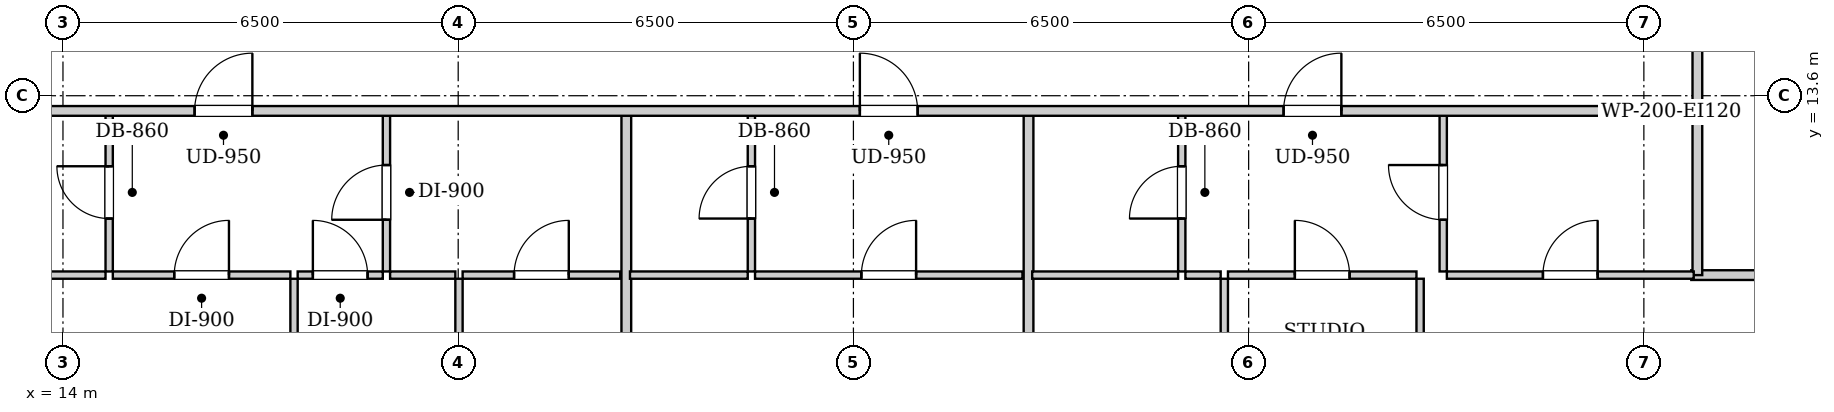
"""IFC4 building model, lengths in metres.
Left out: names, types, materials, properties, quantities, classifications, styles, units other than length and angle.
Written with IfcOpenShell. Run it as: python <this file> out.ifc"""

import sys

from ifc_helpers import new_model, si_unit, direction, frame, frame_2d, origin, place, context, subcontext, project, spatial, rectangle, extrude, element, fill, save


model = new_model("IFC4")
c1 = context("Model", 3, precision=1e-05, world=origin(), true_north=direction((0.0, 1.0)))
c2 = subcontext(c1, "Body", "Model", "MODEL_VIEW")
j1 = project(units=[si_unit("LENGTHUNIT", "METRE"), si_unit("PLANEANGLEUNIT", "RADIAN")], contexts=[c1])
p1 = place(None, origin())
s1 = spatial("IfcSite", under=j1, at=p1, CompositionType="ELEMENT")
p2 = place(p1, origin())
s2 = spatial("IfcBuilding", under=s1, at=p2, CompositionType="ELEMENT")
p3 = place(p2, frame((0.0, 0.0, 87.9)))
s3 = spatial("IfcBuildingStorey", under=s2, at=p3, CompositionType="ELEMENT", Elevation=87.9)
p4 = place(p3, frame((40.88, 13.35, 0.0), z_axis=(0.0, 0.0, 1.0), x_axis=(0.0, 1.0, 0.0)))
e1 = element("IfcWall", 1, at=p4, inside=s3, PredefinedType="PARTITIONING", context=c2, shape_type="SweptSolid", body=[
    extrude(rectangle(XDim=1.74, YDim=0.16, at=frame_2d((0.87, 0.0))), origin(), (0.0, 0.0, 1.0), 2.94),
])
p5 = place(p3, frame((14.76, 10.71, 0.0), z_axis=(0.0, 0.0, 1.0), x_axis=(0.0, 1.0, 0.0)))
e2 = element("IfcWall", 2, at=p5, inside=s3, PredefinedType="PARTITIONING", context=c2, shape_type="SweptSolid", body=[
    extrude(rectangle(XDim=2.6, YDim=0.12, at=frame_2d((1.3, 0.0))), origin(), (0.0, 0.0, 1.0), 2.94),
])
p6 = place(p5, frame((0.87, 0.0, 0.0)))
e3 = element("IfcOpeningElement", 3, at=p6, cuts=e2, PredefinedType="OPENING", context=c2, shape_type="SweptSolid", body=[
    extrude(rectangle(XDim=0.86, YDim=2.05, at=frame_2d((0.43, 1.025))), frame((0.0, 0.07, 0.0), z_axis=(0.0, -1.0, 0.0), x_axis=(1.0, 0.0, 0.0)), (0.0, 0.0, 1.0), 0.14),
])
p7 = place(p3, frame((12.3, 10.65, 0.0), z_axis=(0.0, 0.0, 1.0), x_axis=(1.0, 0.0, 0.0)))
e4 = element("IfcWall", 4, at=p7, inside=s3, PredefinedType="PARTITIONING", context=c2, shape_type="SweptSolid", body=[
    extrude(rectangle(XDim=2.4, YDim=0.12, at=frame_2d((1.2, 0.0))), origin(), (0.0, 0.0, 1.0), 2.94),
])
p8 = place(p3, frame((19.32, 10.71, 0.0), z_axis=(0.0, 0.0, 1.0), x_axis=(0.0, 1.0, 0.0)))
e5 = element("IfcWall", 5, at=p8, inside=s3, PredefinedType="PARTITIONING", context=c2, shape_type="SweptSolid", body=[
    extrude(rectangle(XDim=2.6, YDim=0.12, at=frame_2d((1.3, 0.0))), origin(), (0.0, 0.0, 1.0), 2.94),
])
p9 = place(p8, frame((0.85, 0.0, 0.0)))
e6 = element("IfcOpeningElement", 6, at=p9, cuts=e5, PredefinedType="OPENING", context=c2, shape_type="SweptSolid", body=[
    extrude(rectangle(XDim=0.9, YDim=2.05, at=frame_2d((0.45, 1.025))), frame((0.0, 0.07, 0.0), z_axis=(0.0, -1.0, 0.0), x_axis=(1.0, 0.0, 0.0)), (0.0, 0.0, 1.0), 0.14),
])
p10 = place(p3, frame((14.82, 10.65, 0.0), z_axis=(0.0, 0.0, 1.0), x_axis=(1.0, 0.0, 0.0)))
e7 = element("IfcWall", 7, at=p10, inside=s3, PredefinedType="PARTITIONING", context=c2, shape_type="SweptSolid", body=[
    extrude(rectangle(XDim=2.92, YDim=0.12, at=frame_2d((1.46, 0.0))), origin(), (0.0, 0.0, 1.0), 2.94),
])
p11 = place(p10, frame((1.01, 0.0, 0.0)))
e8 = element("IfcOpeningElement", 8, at=p11, cuts=e7, PredefinedType="OPENING", context=c2, shape_type="SweptSolid", body=[
    extrude(rectangle(XDim=0.9, YDim=2.05, at=frame_2d((0.45, 1.025))), frame((0.0, 0.07, 0.0), z_axis=(0.0, -1.0, 0.0), x_axis=(1.0, 0.0, 0.0)), (0.0, 0.0, 1.0), 0.14),
])
p12 = place(p3, frame((17.86, 10.65, 0.0), z_axis=(0.0, 0.0, 1.0), x_axis=(1.0, 0.0, 0.0)))
e9 = element("IfcWall", 9, at=p12, inside=s3, PredefinedType="PARTITIONING", context=c2, shape_type="SweptSolid", body=[
    extrude(rectangle(XDim=1.4, YDim=0.12, at=frame_2d((0.7, 0.0))), origin(), (0.0, 0.0, 1.0), 2.94),
])
p13 = place(p12, frame((0.25, 0.0, 0.0)))
e10 = element("IfcOpeningElement", 10, at=p13, cuts=e9, PredefinedType="OPENING", context=c2, shape_type="SweptSolid", body=[
    extrude(rectangle(XDim=0.9, YDim=2.05, at=frame_2d((0.45, 1.025))), frame((0.0, 0.07, 0.0), z_axis=(0.0, -1.0, 0.0), x_axis=(1.0, 0.0, 0.0)), (0.0, 0.0, 1.0), 0.14),
])
p14 = place(p3, frame((19.38, 10.65, 0.0), z_axis=(0.0, 0.0, 1.0), x_axis=(1.0, 0.0, 0.0)))
e11 = element("IfcWall", 11, at=p14, inside=s3, PredefinedType="PARTITIONING", context=c2, shape_type="SweptSolid", body=[
    extrude(rectangle(XDim=1.073, YDim=0.12, at=frame_2d((0.537, 0.0))), origin(), (0.0, 0.0, 1.0), 2.94),
])
p15 = place(p3, frame((20.573, 10.65, 0.0), z_axis=(0.0, 0.0, 1.0), x_axis=(1.0, 0.0, 0.0)))
e12 = element("IfcWall", 12, at=p15, inside=s3, PredefinedType="PARTITIONING", context=c2, shape_type="SweptSolid", body=[
    extrude(rectangle(XDim=2.592, YDim=0.12, at=frame_2d((1.296, 0.0))), origin(), (0.0, 0.0, 1.0), 2.94),
])
p16 = place(p15, frame((0.846, 0.0, 0.0)))
e13 = element("IfcOpeningElement", 13, at=p16, cuts=e12, PredefinedType="OPENING", context=c2, shape_type="SweptSolid", body=[
    extrude(rectangle(XDim=0.9, YDim=2.05, at=frame_2d((0.45, 1.025))), frame((0.0, 0.07, 0.0), z_axis=(0.0, -1.0, 0.0), x_axis=(1.0, 0.0, 0.0)), (0.0, 0.0, 1.0), 0.14),
])
p17 = place(p3, frame((17.8, 0.28, 0.0), z_axis=(0.0, 0.0, 1.0), x_axis=(0.0, 1.0, 0.0)))
e14 = element("IfcWall", 14, at=p17, inside=s3, PredefinedType="PARTITIONING", context=c2, shape_type="SweptSolid", body=[
    extrude(rectangle(XDim=10.31, YDim=0.12, at=frame_2d((5.155, 0.0))), origin(), (0.0, 0.0, 1.0), 2.309),
])
p18 = place(p17, frame((4.69, 0.0, 0.0)))
e15 = element("IfcOpeningElement", 15, at=p18, cuts=e14, PredefinedType="OPENING", context=c2, shape_type="SweptSolid", body=[
    extrude(rectangle(XDim=0.9, YDim=2.05, at=frame_2d((0.45, 1.025))), frame((0.0, 0.07, 0.0), z_axis=(0.0, -1.0, 0.0), x_axis=(1.0, 0.0, 0.0)), (0.0, 0.0, 1.0), 0.14),
])
p19 = place(p3, frame((20.513, 0.28, 0.0), z_axis=(0.0, 0.0, 1.0), x_axis=(0.0, 1.0, 0.0)))
e16 = element("IfcWall", 16, at=p19, inside=s3, PredefinedType="PARTITIONING", context=c2, shape_type="SweptSolid", body=[
    extrude(rectangle(XDim=10.31, YDim=0.12, at=frame_2d((5.155, 0.0))), origin(), (0.0, 0.0, 1.0), 2.94),
])
p20 = place(p19, frame((4.69, 0.0, 0.0)))
e17 = element("IfcOpeningElement", 17, at=p20, cuts=e16, PredefinedType="OPENING", context=c2, shape_type="SweptSolid", body=[
    extrude(rectangle(XDim=0.9, YDim=2.05, at=frame_2d((0.45, 1.025))), frame((0.0, 0.07, 0.0), z_axis=(0.0, -1.0, 0.0), x_axis=(1.0, 0.0, 0.0)), (0.0, 0.0, 1.0), 0.14),
])
p21 = place(p3, frame((23.265, 0.28, 0.0), z_axis=(0.0, 0.0, 1.0), x_axis=(0.0, 1.0, 0.0)))
e18 = element("IfcWall", 18, at=p21, inside=s3, PredefinedType="PARTITIONING", context=c2, shape_type="SweptSolid", body=[
    extrude(rectangle(XDim=13.03, YDim=0.16, at=frame_2d((6.515, 0.0))), origin(), (0.0, 0.0, 1.0), 2.94),
])
p22 = place(p3, frame((25.322, 10.71, 0.0), z_axis=(0.0, 0.0, 1.0), x_axis=(0.0, 1.0, 0.0)))
e19 = element("IfcWall", 19, at=p22, inside=s3, PredefinedType="PARTITIONING", context=c2, shape_type="SweptSolid", body=[
    extrude(rectangle(XDim=2.6, YDim=0.12, at=frame_2d((1.3, 0.0))), origin(), (0.0, 0.0, 1.0), 2.94),
])
p23 = place(p22, frame((0.87, 0.0, 0.0)))
e20 = element("IfcOpeningElement", 20, at=p23, cuts=e19, PredefinedType="OPENING", context=c2, shape_type="SweptSolid", body=[
    extrude(rectangle(XDim=0.86, YDim=2.05, at=frame_2d((0.43, 1.025))), frame((0.0, 0.07, 0.0), z_axis=(0.0, -1.0, 0.0), x_axis=(1.0, 0.0, 0.0)), (0.0, 0.0, 1.0), 0.14),
])
p24 = place(p3, frame((23.325, 10.65, 0.0), z_axis=(0.0, 0.0, 1.0), x_axis=(1.0, 0.0, 0.0)))
e21 = element("IfcWall", 21, at=p24, inside=s3, PredefinedType="PARTITIONING", context=c2, shape_type="SweptSolid", body=[
    extrude(rectangle(XDim=1.937, YDim=0.12, at=frame_2d((0.969, 0.0))), origin(), (0.0, 0.0, 1.0), 2.94),
])
p25 = place(p3, frame((25.382, 10.65, 0.0), z_axis=(0.0, 0.0, 1.0), x_axis=(1.0, 0.0, 0.0)))
e22 = element("IfcWall", 22, at=p25, inside=s3, PredefinedType="PARTITIONING", context=c2, shape_type="SweptSolid", body=[
    extrude(rectangle(XDim=4.398, YDim=0.12, at=frame_2d((2.199, 0.0))), origin(), (0.0, 0.0, 1.0), 2.94),
])
p26 = place(p25, frame((1.749, 0.0, 0.0)))
e23 = element("IfcOpeningElement", 23, at=p26, cuts=e22, PredefinedType="OPENING", context=c2, shape_type="SweptSolid", body=[
    extrude(rectangle(XDim=0.9, YDim=2.05, at=frame_2d((0.45, 1.025))), frame((0.0, 0.07, 0.0), z_axis=(0.0, -1.0, 0.0), x_axis=(1.0, 0.0, 0.0)), (0.0, 0.0, 1.0), 0.14),
])
p27 = place(p3, frame((40.78, 10.65, 0.0), z_axis=(0.0, 0.0, 1.0), x_axis=(1.0, 0.0, 0.0)))
e24 = element("IfcWall", 24, at=p27, inside=s3, PredefinedType="PARTITIONING", context=c2, shape_type="SweptSolid", body=[
    extrude(rectangle(XDim=2.34, YDim=0.16, at=frame_2d((1.17, 0.0))), origin(), (0.0, 0.0, 1.0), 2.94),
])
p28 = place(p3, frame((40.88, 10.65, 0.0), z_axis=(0.0, 0.0, 1.0), x_axis=(0.0, 1.0, 0.0)))
e25 = element("IfcWall", 25, at=p28, inside=s3, PredefinedType="PARTITIONING", context=c2, shape_type="SweptSolid", body=[
    extrude(rectangle(XDim=2.66, YDim=0.16, at=frame_2d((1.33, 0.0))), origin(), (0.0, 0.0, 1.0), 2.94),
])
p29 = place(p3, frame((29.88, 0.28, 0.0), z_axis=(0.0, 0.0, 1.0), x_axis=(0.0, 1.0, 0.0)))
e26 = element("IfcWall", 26, at=p29, inside=s3, PredefinedType="PARTITIONING", context=c2, shape_type="SweptSolid", body=[
    extrude(rectangle(XDim=13.03, YDim=0.16, at=frame_2d((6.515, 0.0))), origin(), (0.0, 0.0, 1.0), 2.94),
])
p30 = place(p3, frame((32.4, 10.71, 0.0), z_axis=(0.0, 0.0, 1.0), x_axis=(0.0, 1.0, 0.0)))
e27 = element("IfcWall", 27, at=p30, inside=s3, PredefinedType="PARTITIONING", context=c2, shape_type="SweptSolid", body=[
    extrude(rectangle(XDim=2.6, YDim=0.12, at=frame_2d((1.3, 0.0))), origin(), (0.0, 0.0, 1.0), 2.94),
])
p31 = place(p30, frame((0.87, 0.0, 0.0)))
e28 = element("IfcOpeningElement", 28, at=p31, cuts=e27, PredefinedType="OPENING", context=c2, shape_type="SweptSolid", body=[
    extrude(rectangle(XDim=0.86, YDim=2.05, at=frame_2d((0.43, 1.025))), frame((0.0, 0.07, 0.0), z_axis=(0.0, -1.0, 0.0), x_axis=(1.0, 0.0, 0.0)), (0.0, 0.0, 1.0), 0.14),
])
p32 = place(p3, frame((29.94, 10.65, 0.0), z_axis=(0.0, 0.0, 1.0), x_axis=(1.0, 0.0, 0.0)))
e29 = element("IfcWall", 29, at=p32, inside=s3, PredefinedType="PARTITIONING", context=c2, shape_type="SweptSolid", body=[
    extrude(rectangle(XDim=2.4, YDim=0.12, at=frame_2d((1.2, 0.0))), origin(), (0.0, 0.0, 1.0), 2.94),
])
p33 = place(p3, frame((36.7, 10.71, 0.0), z_axis=(0.0, 0.0, 1.0), x_axis=(0.0, 1.0, 0.0)))
e30 = element("IfcWall", 30, at=p33, inside=s3, PredefinedType="PARTITIONING", context=c2, shape_type="SweptSolid", body=[
    extrude(rectangle(XDim=2.6, YDim=0.12, at=frame_2d((1.3, 0.0))), origin(), (0.0, 0.0, 1.0), 2.94),
])
p34 = place(p33, frame((0.85, 0.0, 0.0)))
e31 = element("IfcOpeningElement", 31, at=p34, cuts=e30, PredefinedType="OPENING", context=c2, shape_type="SweptSolid", body=[
    extrude(rectangle(XDim=0.9, YDim=2.05, at=frame_2d((0.45, 1.025))), frame((0.0, 0.07, 0.0), z_axis=(0.0, -1.0, 0.0), x_axis=(1.0, 0.0, 0.0)), (0.0, 0.0, 1.0), 0.14),
])
p35 = place(p3, frame((32.46, 10.65, 0.0), z_axis=(0.0, 0.0, 1.0), x_axis=(1.0, 0.0, 0.0)))
e32 = element("IfcWall", 32, at=p35, inside=s3, PredefinedType="PARTITIONING", context=c2, shape_type="SweptSolid", body=[
    extrude(rectangle(XDim=0.58, YDim=0.12, at=frame_2d((0.29, 0.0))), origin(), (0.0, 0.0, 1.0), 2.94),
])
p36 = place(p3, frame((33.16, 10.65, 0.0), z_axis=(0.0, 0.0, 1.0), x_axis=(1.0, 0.0, 0.0)))
e33 = element("IfcWall", 33, at=p36, inside=s3, PredefinedType="PARTITIONING", context=c2, shape_type="SweptSolid", body=[
    extrude(rectangle(XDim=3.1, YDim=0.12, at=frame_2d((1.55, 0.0))), origin(), (0.0, 0.0, 1.0), 2.94),
])
p37 = place(p36, frame((1.1, 0.0, 0.0)))
e34 = element("IfcOpeningElement", 34, at=p37, cuts=e33, PredefinedType="OPENING", context=c2, shape_type="SweptSolid", body=[
    extrude(rectangle(XDim=0.9, YDim=2.05, at=frame_2d((0.45, 1.025))), frame((0.0, 0.07, 0.0), z_axis=(0.0, -1.0, 0.0), x_axis=(1.0, 0.0, 0.0)), (0.0, 0.0, 1.0), 0.14),
])
p38 = place(p3, frame((36.76, 10.65, 0.0), z_axis=(0.0, 0.0, 1.0), x_axis=(1.0, 0.0, 0.0)))
e35 = element("IfcWall", 35, at=p38, inside=s3, PredefinedType="PARTITIONING", context=c2, shape_type="SweptSolid", body=[
    extrude(rectangle(XDim=4.06, YDim=0.12, at=frame_2d((2.03, 0.0))), origin(), (0.0, 0.0, 1.0), 2.94),
])
p39 = place(p38, frame((1.58, 0.0, 0.0)))
e36 = element("IfcOpeningElement", 36, at=p39, cuts=e35, PredefinedType="OPENING", context=c2, shape_type="SweptSolid", body=[
    extrude(rectangle(XDim=0.9, YDim=2.05, at=frame_2d((0.45, 1.025))), frame((0.0, 0.07, 0.0), z_axis=(0.0, -1.0, 0.0), x_axis=(1.0, 0.0, 0.0)), (0.0, 0.0, 1.0), 0.14),
])
p40 = place(p3, frame((33.1, 0.28, 0.0), z_axis=(0.0, 0.0, 1.0), x_axis=(0.0, 1.0, 0.0)))
e37 = element("IfcWall", 37, at=p40, inside=s3, PredefinedType="PARTITIONING", context=c2, shape_type="SweptSolid", body=[
    extrude(rectangle(XDim=10.31, YDim=0.12, at=frame_2d((5.155, 0.0))), origin(), (0.0, 0.0, 1.0), 2.309),
])
p41 = place(p40, frame((4.69, 0.0, 0.0)))
e38 = element("IfcOpeningElement", 38, at=p41, cuts=e37, PredefinedType="OPENING", context=c2, shape_type="SweptSolid", body=[
    extrude(rectangle(XDim=0.9, YDim=2.05, at=frame_2d((0.45, 1.025))), frame((0.0, 0.07, 0.0), z_axis=(0.0, -1.0, 0.0), x_axis=(1.0, 0.0, 0.0)), (0.0, 0.0, 1.0), 0.14),
])
p42 = place(p3, frame((36.32, 0.28, 0.0), z_axis=(0.0, 0.0, 1.0), x_axis=(0.0, 1.0, 0.0)))
e39 = element("IfcWall", 39, at=p42, inside=s3, PredefinedType="PARTITIONING", context=c2, shape_type="SweptSolid", body=[
    extrude(rectangle(XDim=10.31, YDim=0.12, at=frame_2d((5.155, 0.0))), origin(), (0.0, 0.0, 1.0), 2.94),
])
p43 = place(p42, frame((4.69, 0.0, 0.0)))
e40 = element("IfcOpeningElement", 40, at=p43, cuts=e39, PredefinedType="OPENING", context=c2, shape_type="SweptSolid", body=[
    extrude(rectangle(XDim=0.9, YDim=2.05, at=frame_2d((0.45, 1.025))), frame((0.0, 0.07, 0.0), z_axis=(0.0, -1.0, 0.0), x_axis=(1.0, 0.0, 0.0)), (0.0, 0.0, 1.0), 0.14),
])
p44 = place(p3, frame((10.05, 13.35, 0.0), z_axis=(0.0, 0.0, 1.0), x_axis=(1.0, 0.0, 0.0)))
e41 = element("IfcWall", 41, at=p44, inside=s3, PredefinedType="PARTITIONING", context=c2, shape_type="SweptSolid", body=[
    extrude(rectangle(XDim=30.8, YDim=0.16, at=frame_2d((15.4, 0.0))), origin(), (0.0, 0.0, 1.0), 2.94),
])
p45 = place(p44, frame((0.62, 0.0, 0.0)))
e42 = element("IfcOpeningElement", 42, at=p45, cuts=e41, PredefinedType="OPENING", context=c2, shape_type="SweptSolid", body=[
    extrude(rectangle(XDim=0.95, YDim=2.1, at=frame_2d((0.475, 1.05))), frame((0.0, 0.09, 0.0), z_axis=(0.0, -1.0, 0.0), x_axis=(1.0, 0.0, 0.0)), (0.0, 0.0, 1.0), 0.18),
])
p46 = place(p44, frame((6.115, 0.0, 0.0)))
e43 = element("IfcOpeningElement", 43, at=p46, cuts=e41, PredefinedType="OPENING", context=c2, shape_type="SweptSolid", body=[
    extrude(rectangle(XDim=0.95, YDim=2.1, at=frame_2d((0.475, 1.05))), frame((0.0, 0.09, 0.0), z_axis=(0.0, -1.0, 0.0), x_axis=(1.0, 0.0, 0.0)), (0.0, 0.0, 1.0), 0.18),
])
p47 = place(p44, frame((17.056, 0.0, 0.0)))
e44 = element("IfcOpeningElement", 44, at=p47, cuts=e41, PredefinedType="OPENING", context=c2, shape_type="SweptSolid", body=[
    extrude(rectangle(XDim=0.95, YDim=2.1, at=frame_2d((0.475, 1.05))), frame((0.0, 0.09, 0.0), z_axis=(0.0, -1.0, 0.0), x_axis=(1.0, 0.0, 0.0)), (0.0, 0.0, 1.0), 0.18),
])
p48 = place(p44, frame((24.025, 0.0, 0.0)))
e45 = element("IfcOpeningElement", 45, at=p48, cuts=e41, PredefinedType="OPENING", context=c2, shape_type="SweptSolid", body=[
    extrude(rectangle(XDim=0.95, YDim=2.1, at=frame_2d((0.475, 1.05))), frame((0.0, 0.09, 0.0), z_axis=(0.0, -1.0, 0.0), x_axis=(1.0, 0.0, 0.0)), (0.0, 0.0, 1.0), 0.18),
])
p49 = place(p6, origin())
e46 = element("IfcDoor", 46, at=p49, inside=s3, OperationType="SINGLE_SWING_RIGHT", PredefinedType="DOOR", context=c2, shape_type="SweptSolid", body=[
    extrude(rectangle(XDim=0.86, YDim=2.05, at=frame_2d((0.43, 1.025))), frame((0.0, 0.025, 0.0), z_axis=(0.0, -1.0, 0.0), x_axis=(1.0, 0.0, 0.0)), (0.0, 0.0, 1.0), 0.05),
])
fill(e3, e46)
p50 = place(p9, origin())
e47 = element("IfcDoor", 47, at=p50, inside=s3, OperationType="SINGLE_SWING_LEFT", PredefinedType="DOOR", context=c2, shape_type="SweptSolid", body=[
    extrude(rectangle(XDim=0.9, YDim=2.05, at=frame_2d((0.45, 1.025))), frame((0.0, 0.025, 0.0), z_axis=(0.0, -1.0, 0.0), x_axis=(1.0, 0.0, 0.0)), (0.0, 0.0, 1.0), 0.05),
])
fill(e6, e47)
p51 = place(p11, origin())
e48 = element("IfcDoor", 48, at=p51, inside=s3, OperationType="SINGLE_SWING_RIGHT", PredefinedType="DOOR", context=c2, shape_type="SweptSolid", body=[
    extrude(rectangle(XDim=0.9, YDim=2.05, at=frame_2d((0.45, 1.025))), frame((0.0, 0.025, 0.0), z_axis=(0.0, -1.0, 0.0), x_axis=(1.0, 0.0, 0.0)), (0.0, 0.0, 1.0), 0.05),
])
fill(e8, e48)
p52 = place(p13, origin())
e49 = element("IfcDoor", 49, at=p52, inside=s3, OperationType="SINGLE_SWING_LEFT", PredefinedType="DOOR", context=c2, shape_type="SweptSolid", body=[
    extrude(rectangle(XDim=0.9, YDim=2.05, at=frame_2d((0.45, 1.025))), frame((0.0, 0.025, 0.0), z_axis=(0.0, -1.0, 0.0), x_axis=(1.0, 0.0, 0.0)), (0.0, 0.0, 1.0), 0.05),
])
fill(e10, e49)
p53 = place(p16, origin())
e50 = element("IfcDoor", 50, at=p53, inside=s3, OperationType="SINGLE_SWING_RIGHT", PredefinedType="DOOR", context=c2, shape_type="SweptSolid", body=[
    extrude(rectangle(XDim=0.9, YDim=2.05, at=frame_2d((0.45, 1.025))), frame((0.0, 0.025, 0.0), z_axis=(0.0, -1.0, 0.0), x_axis=(1.0, 0.0, 0.0)), (0.0, 0.0, 1.0), 0.05),
])
fill(e13, e50)
p54 = place(p23, origin())
e51 = element("IfcDoor", 51, at=p54, inside=s3, OperationType="SINGLE_SWING_LEFT", PredefinedType="DOOR", context=c2, shape_type="SweptSolid", body=[
    extrude(rectangle(XDim=0.86, YDim=2.05, at=frame_2d((0.43, 1.025))), frame((0.0, 0.025, 0.0), z_axis=(0.0, -1.0, 0.0), x_axis=(1.0, 0.0, 0.0)), (0.0, 0.0, 1.0), 0.05),
])
fill(e20, e51)
p55 = place(p26, origin())
e52 = element("IfcDoor", 52, at=p55, inside=s3, OperationType="SINGLE_SWING_RIGHT", PredefinedType="DOOR", context=c2, shape_type="SweptSolid", body=[
    extrude(rectangle(XDim=0.9, YDim=2.05, at=frame_2d((0.45, 1.025))), frame((0.0, 0.025, 0.0), z_axis=(0.0, -1.0, 0.0), x_axis=(1.0, 0.0, 0.0)), (0.0, 0.0, 1.0), 0.05),
])
fill(e23, e52)
p56 = place(p31, origin())
e53 = element("IfcDoor", 53, at=p56, inside=s3, OperationType="SINGLE_SWING_LEFT", PredefinedType="DOOR", context=c2, shape_type="SweptSolid", body=[
    extrude(rectangle(XDim=0.86, YDim=2.05, at=frame_2d((0.43, 1.025))), frame((0.0, 0.025, 0.0), z_axis=(0.0, -1.0, 0.0), x_axis=(1.0, 0.0, 0.0)), (0.0, 0.0, 1.0), 0.05),
])
fill(e28, e53)
p57 = place(p34, origin())
e54 = element("IfcDoor", 54, at=p57, inside=s3, OperationType="SINGLE_SWING_RIGHT", PredefinedType="DOOR", context=c2, shape_type="SweptSolid", body=[
    extrude(rectangle(XDim=0.9, YDim=2.05, at=frame_2d((0.45, 1.025))), frame((0.0, 0.025, 0.0), z_axis=(0.0, -1.0, 0.0), x_axis=(1.0, 0.0, 0.0)), (0.0, 0.0, 1.0), 0.05),
])
fill(e31, e54)
p58 = place(p37, origin())
e55 = element("IfcDoor", 55, at=p58, inside=s3, OperationType="SINGLE_SWING_LEFT", PredefinedType="DOOR", context=c2, shape_type="SweptSolid", body=[
    extrude(rectangle(XDim=0.9, YDim=2.05, at=frame_2d((0.45, 1.025))), frame((0.0, 0.025, 0.0), z_axis=(0.0, -1.0, 0.0), x_axis=(1.0, 0.0, 0.0)), (0.0, 0.0, 1.0), 0.05),
])
fill(e34, e55)
p59 = place(p39, origin())
e56 = element("IfcDoor", 56, at=p59, inside=s3, OperationType="SINGLE_SWING_RIGHT", PredefinedType="DOOR", context=c2, shape_type="SweptSolid", body=[
    extrude(rectangle(XDim=0.9, YDim=2.05, at=frame_2d((0.45, 1.025))), frame((0.0, 0.025, 0.0), z_axis=(0.0, -1.0, 0.0), x_axis=(1.0, 0.0, 0.0)), (0.0, 0.0, 1.0), 0.05),
])
fill(e36, e56)
p60 = place(p46, origin())
e57 = element("IfcDoor", 57, at=p60, inside=s3, OperationType="SINGLE_SWING_RIGHT", PredefinedType="DOOR", context=c2, shape_type="SweptSolid", body=[
    extrude(rectangle(XDim=0.95, YDim=2.1, at=frame_2d((0.475, 1.05))), frame((0.0, 0.025, 0.0), z_axis=(0.0, -1.0, 0.0), x_axis=(1.0, 0.0, 0.0)), (0.0, 0.0, 1.0), 0.05),
])
fill(e43, e57)
p61 = place(p47, origin())
e58 = element("IfcDoor", 58, at=p61, inside=s3, OperationType="SINGLE_SWING_LEFT", PredefinedType="DOOR", context=c2, shape_type="SweptSolid", body=[
    extrude(rectangle(XDim=0.95, YDim=2.1, at=frame_2d((0.475, 1.05))), frame((0.0, 0.025, 0.0), z_axis=(0.0, -1.0, 0.0), x_axis=(1.0, 0.0, 0.0)), (0.0, 0.0, 1.0), 0.05),
])
fill(e44, e58)
p62 = place(p48, origin())
e59 = element("IfcDoor", 59, at=p62, inside=s3, OperationType="SINGLE_SWING_RIGHT", PredefinedType="DOOR", context=c2, shape_type="SweptSolid", body=[
    extrude(rectangle(XDim=0.95, YDim=2.1, at=frame_2d((0.475, 1.05))), frame((0.0, 0.025, 0.0), z_axis=(0.0, -1.0, 0.0), x_axis=(1.0, 0.0, 0.0)), (0.0, 0.0, 1.0), 0.05),
])
fill(e45, e59)
save(model, sys.argv[1])
